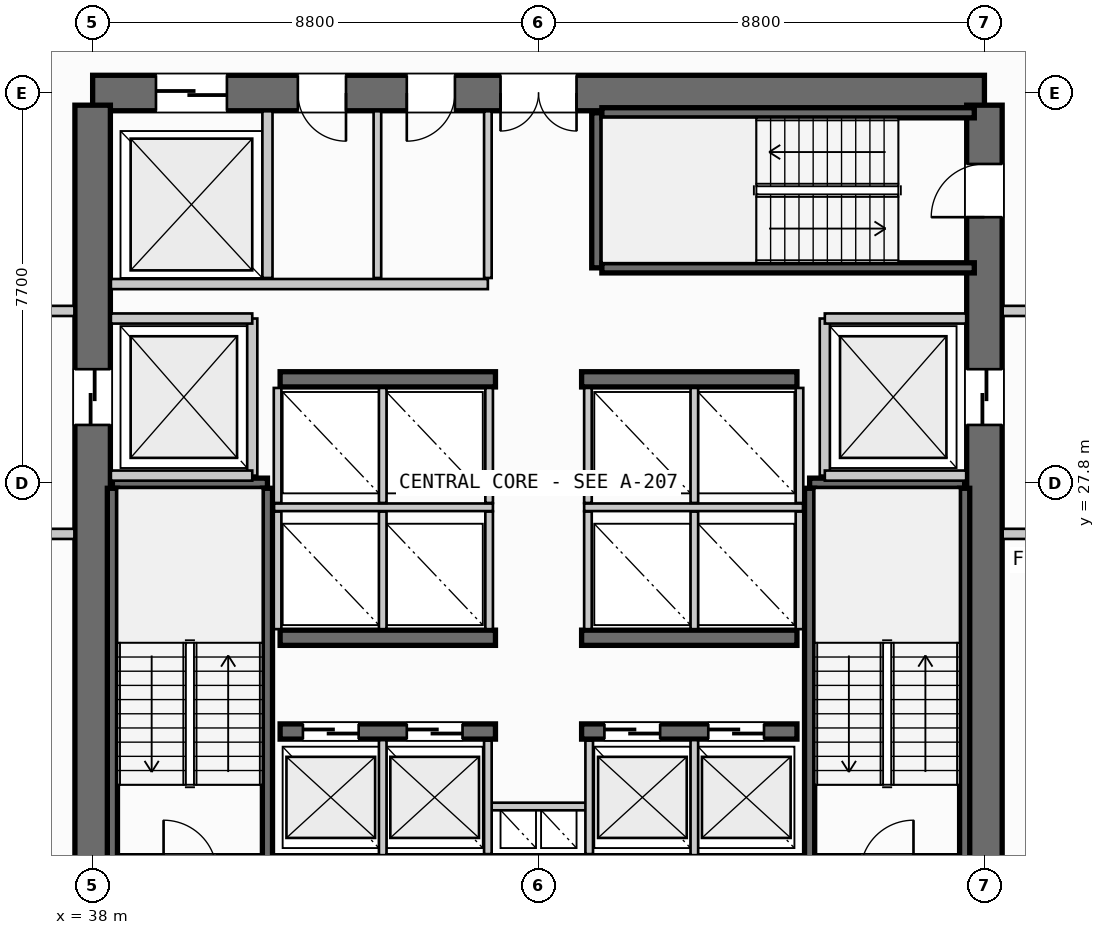
"""IFC4 building model, lengths in metres.
Left out: names, types, materials, properties, quantities, classifications, styles, units other than length and angle.
Written with IfcOpenShell. Run it as: python <this file> out.ifc"""

import sys

from ifc_helpers import new_model, si_unit, direction, frame, frame_2d, origin, place, context, subcontext, project, spatial, rectangle, extrude, source, transform, mapped, element, fill, save


model = new_model("IFC4")
c1 = context("Model", 3, precision=1e-05, world=origin(), true_north=direction((0.0, 1.0)))
c2 = subcontext(c1, "Body", "Model", "MODEL_VIEW")
j1 = project(units=[si_unit("LENGTHUNIT", "METRE"), si_unit("PLANEANGLEUNIT", "RADIAN")], contexts=[c1])
p1 = place(None, origin())
s1 = spatial("IfcSite", under=j1, at=p1, CompositionType="ELEMENT")
p2 = place(p1, origin())
s2 = spatial("IfcBuilding", under=s1, at=p2, CompositionType="ELEMENT")
p3 = place(p2, frame((0.0, 0.0, 48.6)))
s3 = spatial("IfcBuildingStorey", under=s2, at=p3, CompositionType="ELEMENT", Elevation=48.6)
p4 = place(p3, frame((38.0, 20.1, 0.0), z_axis=(0.0, 0.0, 1.0), x_axis=(1.0, 0.0, 0.0)))
e1 = element("IfcWall", 1, at=p4, inside=s3, PredefinedType="SHEAR", context=c2, shape_type="SweptSolid", body=[
    extrude(rectangle(XDim=17.6, YDim=0.7, at=frame_2d((8.8, 0.0))), origin(), (0.0, 0.0, 1.0), 3.55),
])
p5 = place(p4, frame((1.4, 0.0, 0.0)))
e2 = element("IfcOpeningElement", 2, at=p5, cuts=e1, PredefinedType="OPENING", context=c2, shape_type="SweptSolid", body=[
    extrude(rectangle(XDim=1.05, YDim=2.15, at=frame_2d((0.525, 1.075))), frame((0.0, 0.36, 0.0), z_axis=(0.0, -1.0, 0.0), x_axis=(1.0, 0.0, 0.0)), (0.0, 0.0, 1.0), 0.72),
])
p6 = place(p4, frame((15.15, 0.0, 0.0)))
e3 = element("IfcOpeningElement", 3, at=p6, cuts=e1, PredefinedType="OPENING", context=c2, shape_type="SweptSolid", body=[
    extrude(rectangle(XDim=1.05, YDim=2.15, at=frame_2d((0.525, 1.075))), frame((0.0, 0.36, 0.0), z_axis=(0.0, -1.0, 0.0), x_axis=(1.0, 0.0, 0.0)), (0.0, 0.0, 1.0), 0.72),
])
p7 = place(p3, frame((55.6, 35.5, 0.0), z_axis=(0.0, 0.0, 1.0), x_axis=(-1.0, 0.0, 0.0)))
e4 = element("IfcWall", 4, at=p7, inside=s3, PredefinedType="SHEAR", context=c2, shape_type="SweptSolid", body=[
    extrude(rectangle(XDim=17.6, YDim=0.7, at=frame_2d((8.8, 0.0))), origin(), (0.0, 0.0, 1.0), 3.55),
])
p8 = place(p7, frame((8.05, 0.0, 0.0)))
e5 = element("IfcOpeningElement", 5, at=p8, cuts=e4, PredefinedType="OPENING", context=c2, shape_type="SweptSolid", body=[
    extrude(rectangle(XDim=1.5, YDim=2.2, at=frame_2d((0.75, 1.1))), frame((0.0, 0.36, 0.0), z_axis=(0.0, -1.0, 0.0), x_axis=(1.0, 0.0, 0.0)), (0.0, 0.0, 1.0), 0.72),
])
p9 = place(p7, frame((14.95, 0.0, 0.0)))
e6 = element("IfcOpeningElement", 6, at=p9, cuts=e4, PredefinedType="OPENING", context=c2, shape_type="SweptSolid", body=[
    extrude(rectangle(XDim=1.4, YDim=2.3, at=frame_2d((0.7, 1.15))), frame((0.0, 0.36, 0.0), z_axis=(0.0, -1.0, 0.0), x_axis=(1.0, 0.0, 0.0)), (0.0, 0.0, 1.0), 0.72),
])
p10 = place(p7, frame((12.6, 0.0, 0.0)))
e7 = element("IfcOpeningElement", 7, at=p10, cuts=e4, PredefinedType="OPENING", context=c2, shape_type="SweptSolid", body=[
    extrude(rectangle(XDim=0.95, YDim=2.15, at=frame_2d((0.475, 1.075))), frame((0.0, 0.36, 0.0), z_axis=(0.0, -1.0, 0.0), x_axis=(1.0, 0.0, 0.0)), (0.0, 0.0, 1.0), 0.72),
])
p11 = place(p7, frame((10.45, 0.0, 0.0)))
e8 = element("IfcOpeningElement", 8, at=p11, cuts=e4, PredefinedType="OPENING", context=c2, shape_type="SweptSolid", body=[
    extrude(rectangle(XDim=0.95, YDim=2.15, at=frame_2d((0.475, 1.075))), frame((0.0, 0.36, 0.0), z_axis=(0.0, -1.0, 0.0), x_axis=(1.0, 0.0, 0.0)), (0.0, 0.0, 1.0), 0.72),
])
p12 = place(p3, frame((38.0, 35.26, 0.0), z_axis=(0.0, 0.0, 1.0), x_axis=(0.0, -1.0, 0.0)))
e9 = element("IfcWall", 9, at=p12, inside=s3, PredefinedType="SHEAR", context=c2, shape_type="SweptSolid", body=[
    extrude(rectangle(XDim=14.92, YDim=0.7, at=frame_2d((7.46, 0.0))), origin(), (0.0, 0.0, 1.0), 3.55),
])
p13 = place(p12, frame((5.21, 0.0, 0.0)))
e10 = element("IfcOpeningElement", 10, at=p13, cuts=e9, PredefinedType="OPENING", context=c2, shape_type="SweptSolid", body=[
    extrude(rectangle(XDim=1.1, YDim=2.2, at=frame_2d((0.55, 1.1))), frame((0.0, 0.36, 0.0), z_axis=(0.0, -1.0, 0.0), x_axis=(1.0, 0.0, 0.0)), (0.0, 0.0, 1.0), 0.72),
])
p14 = place(p3, frame((55.6, 20.34, 0.0), z_axis=(0.0, 0.0, 1.0), x_axis=(0.0, 1.0, 0.0)))
e11 = element("IfcWall", 11, at=p14, inside=s3, PredefinedType="SHEAR", context=c2, shape_type="SweptSolid", body=[
    extrude(rectangle(XDim=14.92, YDim=0.7, at=frame_2d((7.46, 0.0))), origin(), (0.0, 0.0, 1.0), 3.55),
])
p15 = place(p14, frame((12.71, 0.0, 0.0)))
e12 = element("IfcOpeningElement", 12, at=p15, cuts=e11, PredefinedType="OPENING", context=c2, shape_type="SweptSolid", body=[
    extrude(rectangle(XDim=1.05, YDim=2.15, at=frame_2d((0.525, 1.075))), frame((0.0, 0.36, 0.0), z_axis=(0.0, -1.0, 0.0), x_axis=(1.0, 0.0, 0.0)), (0.0, 0.0, 1.0), 0.72),
])
p16 = place(p14, frame((8.61, 0.0, 0.0)))
e13 = element("IfcOpeningElement", 13, at=p16, cuts=e11, PredefinedType="OPENING", context=c2, shape_type="SweptSolid", body=[
    extrude(rectangle(XDim=1.1, YDim=2.2, at=frame_2d((0.55, 1.1))), frame((0.0, 0.36, 0.0), z_axis=(0.0, -1.0, 0.0), x_axis=(1.0, 0.0, 0.0)), (0.0, 0.0, 1.0), 0.72),
])
p17 = place(p3, frame((41.7, 22.9, 0.0), z_axis=(0.0, 0.0, 1.0), x_axis=(1.0, 0.0, 0.0)))
e14 = element("IfcWall", 14, at=p17, inside=s3, PredefinedType="SHEAR", context=c2, shape_type="SweptSolid", body=[
    extrude(rectangle(XDim=4.25, YDim=0.3, at=frame_2d((2.125, 0.0))), origin(), (0.0, 0.0, 1.0), 3.55),
])
p18 = place(p17, frame((0.45, 0.0, 0.0)))
e15 = element("IfcOpeningElement", 15, at=p18, cuts=e14, PredefinedType="OPENING", context=c2, shape_type="SweptSolid", body=[
    extrude(rectangle(XDim=1.1, YDim=2.2, at=frame_2d((0.55, 1.1))), frame((0.0, 0.16, 0.0), z_axis=(0.0, -1.0, 0.0), x_axis=(1.0, 0.0, 0.0)), (0.0, 0.0, 1.0), 0.32),
])
p19 = place(p17, frame((2.5, 0.0, 0.0)))
e16 = element("IfcOpeningElement", 16, at=p19, cuts=e14, PredefinedType="OPENING", context=c2, shape_type="SweptSolid", body=[
    extrude(rectangle(XDim=1.1, YDim=2.2, at=frame_2d((0.55, 1.1))), frame((0.0, 0.16, 0.0), z_axis=(0.0, -1.0, 0.0), x_axis=(1.0, 0.0, 0.0)), (0.0, 0.0, 1.0), 0.32),
])
p20 = place(p3, frame((47.65, 22.9, 0.0), z_axis=(0.0, 0.0, 1.0), x_axis=(1.0, 0.0, 0.0)))
e17 = element("IfcWall", 17, at=p20, inside=s3, PredefinedType="SHEAR", context=c2, shape_type="SweptSolid", body=[
    extrude(rectangle(XDim=4.25, YDim=0.3, at=frame_2d((2.125, 0.0))), origin(), (0.0, 0.0, 1.0), 3.55),
])
p21 = place(p20, frame((0.45, 0.0, 0.0)))
e18 = element("IfcOpeningElement", 18, at=p21, cuts=e17, PredefinedType="OPENING", context=c2, shape_type="SweptSolid", body=[
    extrude(rectangle(XDim=1.1, YDim=2.2, at=frame_2d((0.55, 1.1))), frame((0.0, 0.16, 0.0), z_axis=(0.0, -1.0, 0.0), x_axis=(1.0, 0.0, 0.0)), (0.0, 0.0, 1.0), 0.32),
])
p22 = place(p20, frame((2.5, 0.0, 0.0)))
e19 = element("IfcOpeningElement", 19, at=p22, cuts=e17, PredefinedType="OPENING", context=c2, shape_type="SweptSolid", body=[
    extrude(rectangle(XDim=1.1, YDim=2.2, at=frame_2d((0.55, 1.1))), frame((0.0, 0.16, 0.0), z_axis=(0.0, -1.0, 0.0), x_axis=(1.0, 0.0, 0.0)), (0.0, 0.0, 1.0), 0.32),
])
for number, where, z_axis, x_axis in (
    (20, (41.7, 24.75, 0.0), (0.0, 0.0, 1.0), (1.0, 0.0, 0.0)),
    (21, (47.65, 24.75, 0.0), (0.0, 0.0, 1.0), (1.0, 0.0, 0.0)),
    (22, (41.7, 29.85, 0.0), (0.0, 0.0, 1.0), (1.0, 0.0, 0.0)),
    (23, (47.65, 29.85, 0.0), (0.0, 0.0, 1.0), (1.0, 0.0, 0.0)),
):
    element("IfcWall", number, at=place(p3, frame(where, z_axis=z_axis, x_axis=x_axis)), inside=s3, PredefinedType="SHEAR", context=c2, shape_type="SweptSolid", body=[
        extrude(rectangle(XDim=4.25, YDim=0.3, at=frame_2d((2.125, 0.0))), origin(), (0.0, 0.0, 1.0), 3.55),
    ])
p23 = place(p3, frame((38.39, 27.8, 0.0), z_axis=(0.0, 0.0, 1.0), x_axis=(1.0, 0.0, 0.0)))
e24 = element("IfcWall", 24, at=p23, inside=s3, PredefinedType="SHEAR", context=c2, shape_type="SweptSolid", body=[
    extrude(rectangle(XDim=3.06, YDim=0.2, at=frame_2d((1.53, 0.0))), origin(), (0.0, 0.0, 1.0), 3.55),
])
for number, where, z_axis, x_axis in (
    (25, (41.45, 27.7, 0.0), (0.0, 0.0, 1.0), (0.0, -1.0, 0.0)),
    (26, (38.39, 20.35, 0.0), (0.0, 0.0, 1.0), (0.0, 1.0, 0.0)),
):
    element("IfcWall", number, at=place(p3, frame(where, z_axis=z_axis, x_axis=x_axis)), inside=s3, PredefinedType="SHEAR", context=c2, shape_type="SweptSolid", body=[
        extrude(rectangle(XDim=7.35, YDim=0.2, at=frame_2d((3.675, 0.0))), origin(), (0.0, 0.0, 1.0), 3.55),
    ])
p24 = place(p3, frame((52.15, 27.8, 0.0), z_axis=(0.0, 0.0, 1.0), x_axis=(1.0, 0.0, 0.0)))
e27 = element("IfcWall", 27, at=p24, inside=s3, PredefinedType="SHEAR", context=c2, shape_type="SweptSolid", body=[
    extrude(rectangle(XDim=3.06, YDim=0.2, at=frame_2d((1.53, 0.0))), origin(), (0.0, 0.0, 1.0), 3.55),
])
for number, where, z_axis, x_axis in (
    (28, (55.21, 27.7, 0.0), (0.0, 0.0, 1.0), (0.0, -1.0, 0.0)),
    (29, (52.15, 20.35, 0.0), (0.0, 0.0, 1.0), (0.0, 1.0, 0.0)),
):
    element("IfcWall", number, at=place(p3, frame(where, z_axis=z_axis, x_axis=x_axis)), inside=s3, PredefinedType="SHEAR", context=c2, shape_type="SweptSolid", body=[
        extrude(rectangle(XDim=7.35, YDim=0.2, at=frame_2d((3.675, 0.0))), origin(), (0.0, 0.0, 1.0), 3.55),
    ])
p25 = place(p3, frame((47.95, 32.05, 0.0), z_axis=(0.0, 0.0, 1.0), x_axis=(0.0, 1.0, 0.0)))
e30 = element("IfcWall", 30, at=p25, inside=s3, PredefinedType="SHEAR", context=c2, shape_type="SweptSolid", body=[
    extrude(rectangle(XDim=3.06, YDim=0.2, at=frame_2d((1.53, 0.0))), origin(), (0.0, 0.0, 1.0), 3.55),
])
for number, where, z_axis, x_axis in (
    (31, (48.05, 35.11, 0.0), (0.0, 0.0, 1.0), (1.0, 0.0, 0.0)),
    (32, (55.4, 32.05, 0.0), (0.0, 0.0, 1.0), (-1.0, 0.0, 0.0)),
):
    element("IfcWall", number, at=place(p3, frame(where, z_axis=z_axis, x_axis=x_axis)), inside=s3, PredefinedType="SHEAR", context=c2, shape_type="SweptSolid", body=[
        extrude(rectangle(XDim=7.35, YDim=0.2, at=frame_2d((3.675, 0.0))), origin(), (0.0, 0.0, 1.0), 3.55),
    ])
p26 = place(p3, frame((45.8, 21.42, 0.0), z_axis=(0.0, 0.0, 1.0), x_axis=(1.0, 0.0, 0.0)))
e33 = element("IfcWall", 33, at=p26, inside=s3, PredefinedType="PARTITIONING", context=c2, shape_type="SweptSolid", body=[
    extrude(rectangle(XDim=2.0, YDim=0.15, at=frame_2d((1.0, 0.0))), origin(), (0.0, 0.0, 1.0), 2.785),
])
for number, where, z_axis, x_axis in (
    (34, (45.8, 20.48, 0.0), (0.0, 0.0, 1.0), (0.0, 1.0, 0.0)),
    (35, (47.8, 20.48, 0.0), (0.0, 0.0, 1.0), (0.0, 1.0, 0.0)),
):
    element("IfcWall", number, at=place(p3, frame(where, z_axis=z_axis, x_axis=x_axis)), inside=s3, PredefinedType="PARTITIONING", context=c2, shape_type="SweptSolid", body=[
        extrude(rectangle(XDim=2.24, YDim=0.15, at=frame_2d((1.12, 0.0))), origin(), (0.0, 0.0, 1.0), 2.785),
    ])
p27 = place(p3, frame((41.15, 27.95, 0.0), z_axis=(0.0, 0.0, 1.0), x_axis=(0.0, 1.0, 0.0)))
e36 = element("IfcWall", 36, at=p27, inside=s3, PredefinedType="PARTITIONING", context=c2, shape_type="SweptSolid", body=[
    extrude(rectangle(XDim=3.1, YDim=0.2, at=frame_2d((1.55, 0.0))), origin(), (0.0, 0.0, 1.0), 2.785),
])
for number, where, z_axis, x_axis in (
    (37, (38.36, 27.95, 0.0), (0.0, 0.0, 1.0), (1.0, 0.0, 0.0)),
    (38, (38.36, 31.05, 0.0), (0.0, 0.0, 1.0), (1.0, 0.0, 0.0)),
):
    element("IfcWall", number, at=place(p3, frame(where, z_axis=z_axis, x_axis=x_axis)), inside=s3, PredefinedType="PARTITIONING", context=c2, shape_type="SweptSolid", body=[
        extrude(rectangle(XDim=2.79, YDim=0.2, at=frame_2d((1.395, 0.0))), origin(), (0.0, 0.0, 1.0), 2.785),
    ])
for number, where, z_axis, x_axis in (
    (39, (34.5, 26.8, 0.0), (0.0, 0.0, 1.0), (1.0, 0.0, 0.0)),
    (40, (34.5, 31.2, 0.0), (0.0, 0.0, 1.0), (1.0, 0.0, 0.0)),
):
    element("IfcWall", number, at=place(p3, frame(where, z_axis=z_axis, x_axis=x_axis)), inside=s3, PredefinedType="PARTITIONING", context=c2, shape_type="SweptSolid", body=[
        extrude(rectangle(XDim=3.14, YDim=0.2, at=frame_2d((1.57, 0.0))), origin(), (0.0, 0.0, 1.0), 2.785),
    ])
p28 = place(p3, frame((52.45, 27.95, 0.0), z_axis=(0.0, 0.0, 1.0), x_axis=(0.0, 1.0, 0.0)))
e41 = element("IfcWall", 41, at=p28, inside=s3, PredefinedType="PARTITIONING", context=c2, shape_type="SweptSolid", body=[
    extrude(rectangle(XDim=3.1, YDim=0.2, at=frame_2d((1.55, 0.0))), origin(), (0.0, 0.0, 1.0), 2.785),
])
for number, where, z_axis, x_axis in (
    (42, (52.45, 27.95, 0.0), (0.0, 0.0, 1.0), (1.0, 0.0, 0.0)),
    (43, (52.45, 31.05, 0.0), (0.0, 0.0, 1.0), (1.0, 0.0, 0.0)),
):
    element("IfcWall", number, at=place(p3, frame(where, z_axis=z_axis, x_axis=x_axis)), inside=s3, PredefinedType="PARTITIONING", context=c2, shape_type="SweptSolid", body=[
        extrude(rectangle(XDim=2.79, YDim=0.2, at=frame_2d((1.395, 0.0))), origin(), (0.0, 0.0, 1.0), 2.785),
    ])
for number, where, z_axis, x_axis in (
    (44, (55.96, 26.8, 0.0), (0.0, 0.0, 1.0), (1.0, 0.0, 0.0)),
    (45, (55.96, 31.2, 0.0), (0.0, 0.0, 1.0), (1.0, 0.0, 0.0)),
):
    element("IfcWall", number, at=place(p3, frame(where, z_axis=z_axis, x_axis=x_axis)), inside=s3, PredefinedType="PARTITIONING", context=c2, shape_type="SweptSolid", body=[
        extrude(rectangle(XDim=3.14, YDim=0.2, at=frame_2d((1.57, 0.0))), origin(), (0.0, 0.0, 1.0), 2.785),
    ])
for number, where, z_axis, x_axis in (
    (46, (43.725, 20.46, 0.0), (0.0, 0.0, 1.0), (0.0, 1.0, 0.0)),
    (47, (49.875, 20.46, 0.0), (0.0, 0.0, 1.0), (0.0, 1.0, 0.0)),
):
    element("IfcWall", number, at=place(p3, frame(where, z_axis=z_axis, x_axis=x_axis)), inside=s3, PredefinedType="PARTITIONING", context=c2, shape_type="SweptSolid", body=[
        extrude(rectangle(XDim=2.27, YDim=0.15, at=frame_2d((1.135, 0.0))), origin(), (0.0, 0.0, 1.0), 2.785),
    ])
p29 = place(p3, frame((41.58, 27.325, 0.0), z_axis=(0.0, 0.0, 1.0), x_axis=(1.0, 0.0, 0.0)))
e48 = element("IfcWall", 48, at=p29, inside=s3, PredefinedType="PARTITIONING", context=c2, shape_type="SweptSolid", body=[
    extrude(rectangle(XDim=4.32, YDim=0.15, at=frame_2d((2.16, 0.0))), origin(), (0.0, 0.0, 1.0), 2.785),
])
p30 = place(p3, frame((47.7, 27.325, 0.0), z_axis=(0.0, 0.0, 1.0), x_axis=(1.0, 0.0, 0.0)))
e49 = element("IfcWall", 49, at=p30, inside=s3, PredefinedType="PARTITIONING", context=c2, shape_type="SweptSolid", body=[
    extrude(rectangle(XDim=4.32, YDim=0.15, at=frame_2d((2.16, 0.0))), origin(), (0.0, 0.0, 1.0), 2.785),
])
for number, where, z_axis, x_axis in (
    (50, (41.65, 24.92, 0.0), (0.0, 0.0, 1.0), (0.0, 1.0, 0.0)),
    (51, (43.725, 24.92, 0.0), (0.0, 0.0, 1.0), (0.0, 1.0, 0.0)),
    (52, (45.825, 24.92, 0.0), (0.0, 0.0, 1.0), (0.0, 1.0, 0.0)),
    (53, (47.775, 24.92, 0.0), (0.0, 0.0, 1.0), (0.0, 1.0, 0.0)),
    (54, (49.875, 24.92, 0.0), (0.0, 0.0, 1.0), (0.0, 1.0, 0.0)),
    (55, (51.95, 24.92, 0.0), (0.0, 0.0, 1.0), (0.0, 1.0, 0.0)),
):
    element("IfcWall", number, at=place(p3, frame(where, z_axis=z_axis, x_axis=x_axis)), inside=s3, PredefinedType="PARTITIONING", context=c2, shape_type="SweptSolid", body=[
        extrude(rectangle(XDim=2.32, YDim=0.15, at=frame_2d((1.16, 0.0))), origin(), (0.0, 0.0, 1.0), 2.785),
    ])
for number, where, z_axis, x_axis in (
    (56, (41.65, 27.41, 0.0), (0.0, 0.0, 1.0), (0.0, 1.0, 0.0)),
    (57, (43.725, 27.41, 0.0), (0.0, 0.0, 1.0), (0.0, 1.0, 0.0)),
    (58, (45.825, 27.41, 0.0), (0.0, 0.0, 1.0), (0.0, 1.0, 0.0)),
    (59, (47.775, 27.41, 0.0), (0.0, 0.0, 1.0), (0.0, 1.0, 0.0)),
    (60, (49.875, 27.41, 0.0), (0.0, 0.0, 1.0), (0.0, 1.0, 0.0)),
    (61, (51.95, 27.41, 0.0), (0.0, 0.0, 1.0), (0.0, 1.0, 0.0)),
):
    element("IfcWall", number, at=place(p3, frame(where, z_axis=z_axis, x_axis=x_axis)), inside=s3, PredefinedType="PARTITIONING", context=c2, shape_type="SweptSolid", body=[
        extrude(rectangle(XDim=2.27, YDim=0.15, at=frame_2d((1.135, 0.0))), origin(), (0.0, 0.0, 1.0), 2.785),
    ])
p31 = place(p3, frame((41.45, 31.85, 0.0), z_axis=(0.0, 0.0, 1.0), x_axis=(0.0, 1.0, 0.0)))
e62 = element("IfcWall", 62, at=p31, inside=s3, PredefinedType="PARTITIONING", context=c2, shape_type="SweptSolid", body=[
    extrude(rectangle(XDim=3.29, YDim=0.2, at=frame_2d((1.645, 0.0))), origin(), (0.0, 0.0, 1.0), 2.785),
])
p32 = place(p3, frame((38.36, 31.73, 0.0), z_axis=(0.0, 0.0, 1.0), x_axis=(1.0, 0.0, 0.0)))
e63 = element("IfcWall", 63, at=p32, inside=s3, PredefinedType="PARTITIONING", context=c2, shape_type="SweptSolid", body=[
    extrude(rectangle(XDim=7.44, YDim=0.2, at=frame_2d((3.72, 0.0))), origin(), (0.0, 0.0, 1.0), 2.785),
])
p33 = place(p3, frame((45.8, 31.85, 0.0), z_axis=(0.0, 0.0, 1.0), x_axis=(0.0, 1.0, 0.0)))
e64 = element("IfcWall", 64, at=p33, inside=s3, PredefinedType="PARTITIONING", context=c2, shape_type="SweptSolid", body=[
    extrude(rectangle(XDim=3.29, YDim=0.15, at=frame_2d((1.645, 0.0))), origin(), (0.0, 0.0, 1.0), 2.785),
])
p34 = place(p3, frame((43.62, 31.85, 0.0), z_axis=(0.0, 0.0, 1.0), x_axis=(0.0, 1.0, 0.0)))
e65 = element("IfcWall", 65, at=p34, inside=s3, PredefinedType="PLUMBINGWALL", context=c2, shape_type="SweptSolid", body=[
    extrude(rectangle(XDim=3.29, YDim=0.15, at=frame_2d((1.645, 0.0))), origin(), (0.0, 0.0, 1.0), 2.785),
])
m1 = source(origin(), c2, "Body", "SweptSolid", [
    extrude(rectangle(XDim=1.05, YDim=2.15, at=frame_2d((0.525, 1.075))), frame((0.0, 0.025, 0.0), z_axis=(0.0, -1.0, 0.0), x_axis=(1.0, 0.0, 0.0)), (0.0, 0.0, 1.0), 0.05),
])
p35 = place(p15, origin())
e66 = element("IfcDoor", 66, at=p35, inside=s3, OperationType="SINGLE_SWING_LEFT", PredefinedType="DOOR", context=c2, shape_type="MappedRepresentation", body=[
    mapped(m1, transform((0.0, 0.0, 0.0), scale=1.0)),
])
fill(e12, e66)
m2 = source(origin(), c2, "Body", "SweptSolid", [
    extrude(rectangle(XDim=1.5, YDim=2.2, at=frame_2d((0.75, 1.1))), frame((0.0, 0.025, 0.0), z_axis=(0.0, -1.0, 0.0), x_axis=(1.0, 0.0, 0.0)), (0.0, 0.0, 1.0), 0.05),
])
p36 = place(p8, origin())
e67 = element("IfcDoor", 67, at=p36, inside=s3, OperationType="DOUBLE_DOOR_SINGLE_SWING", PredefinedType="DOOR", context=c2, shape_type="MappedRepresentation", body=[
    mapped(m2, transform((0.0, 0.0, 0.0), scale=1.0)),
])
fill(e5, e67)
m3 = source(origin(), c2, "Body", "SweptSolid", [
    extrude(rectangle(XDim=1.1, YDim=2.2, at=frame_2d((0.55, 1.1))), frame((0.0, 0.025, 0.0), z_axis=(0.0, -1.0, 0.0), x_axis=(1.0, 0.0, 0.0)), (0.0, 0.0, 1.0), 0.05),
])
p37 = place(p13, origin())
e68 = element("IfcDoor", 68, at=p37, inside=s3, OperationType="SLIDING_TO_LEFT", PredefinedType="DOOR", context=c2, shape_type="MappedRepresentation", body=[
    mapped(m3, transform((0.0, 0.0, 0.0), scale=1.0)),
])
fill(e10, e68)
p38 = place(p16, origin())
e69 = element("IfcDoor", 69, at=p38, inside=s3, OperationType="SLIDING_TO_RIGHT", PredefinedType="DOOR", context=c2, shape_type="MappedRepresentation", body=[
    mapped(m3, transform((0.0, 0.0, 0.0), scale=1.0)),
])
fill(e13, e69)
p39 = place(p18, origin())
e70 = element("IfcDoor", 70, at=p39, inside=s3, OperationType="SLIDING_TO_LEFT", PredefinedType="DOOR", context=c2, shape_type="MappedRepresentation", body=[
    mapped(m3, transform((0.0, 0.0, 0.0), scale=1.0)),
])
fill(e15, e70)
p40 = place(p19, origin())
e71 = element("IfcDoor", 71, at=p40, inside=s3, OperationType="SLIDING_TO_LEFT", PredefinedType="DOOR", context=c2, shape_type="MappedRepresentation", body=[
    mapped(m3, transform((0.0, 0.0, 0.0), scale=1.0)),
])
fill(e16, e71)
p41 = place(p21, origin())
e72 = element("IfcDoor", 72, at=p41, inside=s3, OperationType="SLIDING_TO_LEFT", PredefinedType="DOOR", context=c2, shape_type="MappedRepresentation", body=[
    mapped(m3, transform((0.0, 0.0, 0.0), scale=1.0)),
])
fill(e18, e72)
p42 = place(p22, origin())
e73 = element("IfcDoor", 73, at=p42, inside=s3, OperationType="SLIDING_TO_LEFT", PredefinedType="DOOR", context=c2, shape_type="MappedRepresentation", body=[
    mapped(m3, transform((0.0, 0.0, 0.0), scale=1.0)),
])
fill(e19, e73)
m4 = source(origin(), c2, "Body", "SweptSolid", [
    extrude(rectangle(XDim=1.4, YDim=2.3, at=frame_2d((0.7, 1.15))), frame((0.0, 0.025, 0.0), z_axis=(0.0, -1.0, 0.0), x_axis=(1.0, 0.0, 0.0)), (0.0, 0.0, 1.0), 0.05),
])
p43 = place(p9, origin())
e74 = element("IfcDoor", 74, at=p43, inside=s3, OperationType="SLIDING_TO_RIGHT", PredefinedType="DOOR", context=c2, shape_type="MappedRepresentation", body=[
    mapped(m4, transform((0.0, 0.0, 0.0), scale=1.0)),
])
fill(e6, e74)
m5 = source(origin(), c2, "Body", "SweptSolid", [
    extrude(rectangle(XDim=0.95, YDim=2.15, at=frame_2d((0.475, 1.075))), frame((0.0, 0.025, 0.0), z_axis=(0.0, -1.0, 0.0), x_axis=(1.0, 0.0, 0.0)), (0.0, 0.0, 1.0), 0.05),
])
p44 = place(p10, origin())
e75 = element("IfcDoor", 75, at=p44, inside=s3, OperationType="SINGLE_SWING_LEFT", PredefinedType="DOOR", context=c2, shape_type="MappedRepresentation", body=[
    mapped(m5, transform((0.0, 0.0, 0.0), scale=1.0)),
])
fill(e7, e75)
p45 = place(p11, origin())
e76 = element("IfcDoor", 76, at=p45, inside=s3, OperationType="SINGLE_SWING_RIGHT", PredefinedType="DOOR", context=c2, shape_type="MappedRepresentation", body=[
    mapped(m5, transform((0.0, 0.0, 0.0), scale=1.0)),
])
fill(e8, e76)
save(model, sys.argv[1])
